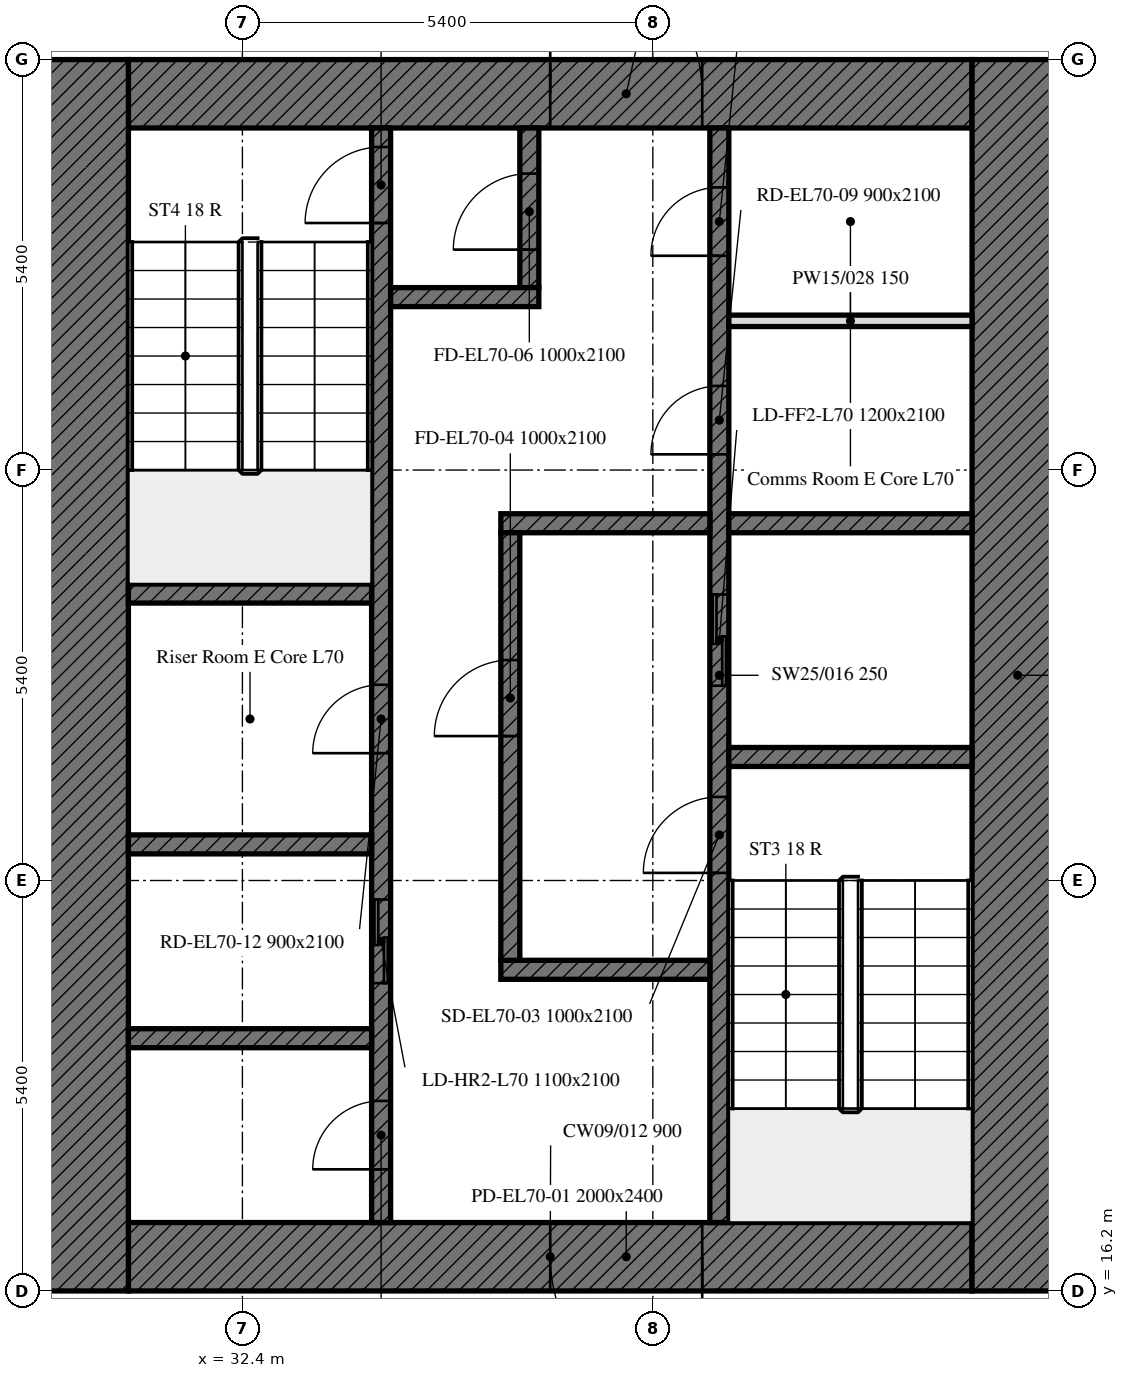
"""IFC4 building model, lengths in metres.
Left out: names, types, materials, properties, quantities, classifications, styles, units other than length and angle.
Written with IfcOpenShell. Run it as: python <this file> out.ifc"""

import sys

from ifc_helpers import new_model, si_unit, direction, frame, frame_2d, origin, place, context, subcontext, project, spatial, rectangle, extrude, element, fill, save


model = new_model("IFC4")
c1 = context("Model", 3, precision=1e-05, world=origin(), true_north=direction((0.0, 1.0)))
c2 = subcontext(c1, "Body", "Model", "MODEL_VIEW")
j1 = project(units=[si_unit("LENGTHUNIT", "METRE"), si_unit("PLANEANGLEUNIT", "RADIAN")], contexts=[c1])
p1 = place(None, origin())
s1 = spatial("IfcSite", under=j1, at=p1, CompositionType="ELEMENT")
p2 = place(p1, origin())
s2 = spatial("IfcBuilding", under=s1, at=p2, CompositionType="ELEMENT")
p3 = place(p2, frame((0.0, 0.0, 285.1)))
s3 = spatial("IfcBuildingStorey", under=s2, at=p3, CompositionType="ELEMENT", Elevation=285.1)
p4 = place(p3, frame((42.0, 16.65, 0.0), z_axis=(0.0, 0.0, 1.0), x_axis=(-1.0, 0.0, 0.0)))
e1 = element("IfcWall", 1, at=p4, inside=s3, PredefinedType="SOLIDWALL", context=c2, shape_type="SweptSolid", body=[
    extrude(rectangle(XDim=11.1, YDim=0.9, at=frame_2d((5.55, 0.0))), origin(), (0.0, 0.0, 1.0), 3.0),
])
p5 = place(p4, frame((3.55, 0.0, 0.0)))
e2 = element("IfcOpeningElement", 2, at=p5, cuts=e1, PredefinedType="OPENING", context=c2, shape_type="SweptSolid", body=[
    extrude(rectangle(XDim=2.0, YDim=2.4, at=frame_2d((1.0, 1.2))), frame((0.0, 0.45, 0.0), z_axis=(0.0, -1.0, 0.0), x_axis=(1.0, 0.0, 0.0)), (0.0, 0.0, 1.0), 0.9),
])
p6 = place(p3, frame((30.9, 31.95, 0.0), z_axis=(0.0, 0.0, 1.0), x_axis=(1.0, 0.0, 0.0)))
e3 = element("IfcWall", 3, at=p6, inside=s3, PredefinedType="SOLIDWALL", context=c2, shape_type="SweptSolid", body=[
    extrude(rectangle(XDim=11.1, YDim=0.9, at=frame_2d((5.55, 0.0))), origin(), (0.0, 0.0, 1.0), 3.0),
])
p7 = place(p6, frame((5.55, 0.0, 0.0)))
e4 = element("IfcOpeningElement", 4, at=p7, cuts=e3, PredefinedType="OPENING", context=c2, shape_type="SweptSolid", body=[
    extrude(rectangle(XDim=2.0, YDim=2.4, at=frame_2d((1.0, 1.2))), frame((0.0, 0.45, 0.0), z_axis=(0.0, -1.0, 0.0), x_axis=(1.0, 0.0, 0.0)), (0.0, 0.0, 1.0), 0.9),
])
for number, where, z_axis, x_axis in (
    (5, (42.6, 32.4, 0.0), (0.0, 0.0, 1.0), (0.0, -1.0, 0.0)),
    (6, (30.3, 16.2, 0.0), (0.0, 0.0, 1.0), (0.0, 1.0, 0.0)),
):
    element("IfcWall", number, at=place(p3, frame(where, z_axis=z_axis, x_axis=x_axis)), inside=s3, PredefinedType="SOLIDWALL", context=c2, shape_type="SweptSolid", body=[
        extrude(rectangle(XDim=16.2, YDim=1.2, at=frame_2d((8.1, 0.0))), origin(), (0.0, 0.0, 1.0), 3.0),
    ])
p8 = place(p3, frame((38.675, 17.1, 0.0), z_axis=(0.0, 0.0, 1.0), x_axis=(0.0, 1.0, 0.0)))
e7 = element("IfcWall", 7, at=p8, inside=s3, PredefinedType="SOLIDWALL", context=c2, shape_type="SweptSolid", body=[
    extrude(rectangle(XDim=14.4, YDim=0.25, at=frame_2d((7.2, 0.0))), origin(), (0.0, 0.0, 1.0), 3.0),
])
p9 = place(p8, frame((4.6, 0.0, 0.0)))
e8 = element("IfcOpeningElement", 8, at=p9, cuts=e7, PredefinedType="OPENING", context=c2, shape_type="SweptSolid", body=[
    extrude(rectangle(XDim=1.0, YDim=2.1, at=frame_2d((0.5, 1.05))), frame((0.0, 0.125, 0.0), z_axis=(0.0, -1.0, 0.0), x_axis=(1.0, 0.0, 0.0)), (0.0, 0.0, 1.0), 0.25),
])
p10 = place(p8, frame((7.062, 0.0, 0.0)))
e9 = element("IfcOpeningElement", 9, at=p10, cuts=e7, PredefinedType="OPENING", context=c2, shape_type="SweptSolid", body=[
    extrude(rectangle(XDim=1.2, YDim=2.1, at=frame_2d((0.6, 1.05))), frame((0.0, 0.125, 0.0), z_axis=(0.0, -1.0, 0.0), x_axis=(1.0, 0.0, 0.0)), (0.0, 0.0, 1.0), 0.25),
])
p11 = place(p8, frame((10.106, 0.0, 0.0)))
e10 = element("IfcOpeningElement", 10, at=p11, cuts=e7, PredefinedType="OPENING", context=c2, shape_type="SweptSolid", body=[
    extrude(rectangle(XDim=0.9, YDim=2.1, at=frame_2d((0.45, 1.05))), frame((0.0, 0.125, 0.0), z_axis=(0.0, -1.0, 0.0), x_axis=(1.0, 0.0, 0.0)), (0.0, 0.0, 1.0), 0.25),
])
p12 = place(p8, frame((12.719, 0.0, 0.0)))
e11 = element("IfcOpeningElement", 11, at=p12, cuts=e7, PredefinedType="OPENING", context=c2, shape_type="SweptSolid", body=[
    extrude(rectangle(XDim=0.9, YDim=2.1, at=frame_2d((0.45, 1.05))), frame((0.0, 0.125, 0.0), z_axis=(0.0, -1.0, 0.0), x_axis=(1.0, 0.0, 0.0)), (0.0, 0.0, 1.0), 0.25),
])
p13 = place(p3, frame((34.225, 17.1, 0.0), z_axis=(0.0, 0.0, 1.0), x_axis=(0.0, 1.0, 0.0)))
e12 = element("IfcWall", 12, at=p13, inside=s3, PredefinedType="SOLIDWALL", context=c2, shape_type="SweptSolid", body=[
    extrude(rectangle(XDim=14.4, YDim=0.25, at=frame_2d((7.2, 0.0))), origin(), (0.0, 0.0, 1.0), 3.0),
])
p14 = place(p13, frame((13.15, 0.0, 0.0)))
e13 = element("IfcOpeningElement", 13, at=p14, cuts=e12, PredefinedType="OPENING", context=c2, shape_type="SweptSolid", body=[
    extrude(rectangle(XDim=1.0, YDim=2.1, at=frame_2d((0.5, 1.05))), frame((0.0, 0.125, 0.0), z_axis=(0.0, -1.0, 0.0), x_axis=(1.0, 0.0, 0.0)), (0.0, 0.0, 1.0), 0.25),
])
p15 = place(p13, frame((3.15, 0.0, 0.0)))
e14 = element("IfcOpeningElement", 14, at=p15, cuts=e12, PredefinedType="OPENING", context=c2, shape_type="SweptSolid", body=[
    extrude(rectangle(XDim=1.1, YDim=2.1, at=frame_2d((0.55, 1.05))), frame((0.0, 0.125, 0.0), z_axis=(0.0, -1.0, 0.0), x_axis=(1.0, 0.0, 0.0)), (0.0, 0.0, 1.0), 0.25),
])
p16 = place(p13, frame((0.7, 0.0, 0.0)))
e15 = element("IfcOpeningElement", 15, at=p16, cuts=e12, PredefinedType="OPENING", context=c2, shape_type="SweptSolid", body=[
    extrude(rectangle(XDim=0.9, YDim=2.1, at=frame_2d((0.45, 1.05))), frame((0.0, 0.125, 0.0), z_axis=(0.0, -1.0, 0.0), x_axis=(1.0, 0.0, 0.0)), (0.0, 0.0, 1.0), 0.25),
])
p17 = place(p13, frame((6.175, 0.0, 0.0)))
e16 = element("IfcOpeningElement", 16, at=p17, cuts=e12, PredefinedType="OPENING", context=c2, shape_type="SweptSolid", body=[
    extrude(rectangle(XDim=0.9, YDim=2.1, at=frame_2d((0.45, 1.05))), frame((0.0, 0.125, 0.0), z_axis=(0.0, -1.0, 0.0), x_axis=(1.0, 0.0, 0.0)), (0.0, 0.0, 1.0), 0.25),
])
p18 = place(p3, frame((38.8, 23.225, 0.0), z_axis=(0.0, 0.0, 1.0), x_axis=(1.0, 0.0, 0.0)))
e17 = element("IfcWall", 17, at=p18, inside=s3, PredefinedType="SOLIDWALL", context=c2, shape_type="SweptSolid", body=[
    extrude(rectangle(XDim=3.2, YDim=0.25, at=frame_2d((1.6, 0.0))), origin(), (0.0, 0.0, 1.0), 3.0),
])
for number, where, z_axis, x_axis in (
    (18, (30.9, 25.375, 0.0), (0.0, 0.0, 1.0), (1.0, 0.0, 0.0)),
    (19, (30.9, 22.075, 0.0), (0.0, 0.0, 1.0), (1.0, 0.0, 0.0)),
):
    element("IfcWall", number, at=place(p3, frame(where, z_axis=z_axis, x_axis=x_axis)), inside=s3, PredefinedType="SOLIDWALL", context=c2, shape_type="SweptSolid", body=[
        extrude(rectangle(XDim=3.2, YDim=0.25, at=frame_2d((1.6, 0.0))), origin(), (0.0, 0.0, 1.0), 3.0),
    ])
p19 = place(p3, frame((38.8, 26.3, 0.0), z_axis=(0.0, 0.0, 1.0), x_axis=(1.0, 0.0, 0.0)))
e20 = element("IfcWall", 20, at=p19, inside=s3, PredefinedType="SOLIDWALL", context=c2, shape_type="SweptSolid", body=[
    extrude(rectangle(XDim=3.2, YDim=0.25, at=frame_2d((1.6, 0.0))), origin(), (0.0, 0.0, 1.0), 3.0),
])
for number, where, z_axis, x_axis in (
    (21, (35.8, 26.3, 0.0), (0.0, 0.0, 1.0), (1.0, 0.0, 0.0)),
    (22, (35.8, 20.425, 0.0), (0.0, 0.0, 1.0), (1.0, 0.0, 0.0)),
):
    element("IfcWall", number, at=place(p3, frame(where, z_axis=z_axis, x_axis=x_axis)), inside=s3, PredefinedType="SOLIDWALL", context=c2, shape_type="SweptSolid", body=[
        extrude(rectangle(XDim=2.75, YDim=0.25, at=frame_2d((1.375, 0.0))), origin(), (0.0, 0.0, 1.0), 3.0),
    ])
p20 = place(p3, frame((36.175, 29.4, 0.0), z_axis=(0.0, 0.0, 1.0), x_axis=(0.0, 1.0, 0.0)))
e23 = element("IfcWall", 23, at=p20, inside=s3, PredefinedType="SOLIDWALL", context=c2, shape_type="SweptSolid", body=[
    extrude(rectangle(XDim=2.1, YDim=0.25, at=frame_2d((1.05, 0.0))), origin(), (0.0, 0.0, 1.0), 3.0),
])
p21 = place(p20, frame((0.5, 0.0, 0.0)))
e24 = element("IfcOpeningElement", 24, at=p21, cuts=e23, PredefinedType="OPENING", context=c2, shape_type="SweptSolid", body=[
    extrude(rectangle(XDim=1.0, YDim=2.1, at=frame_2d((0.5, 1.05))), frame((0.0, 0.125, 0.0), z_axis=(0.0, -1.0, 0.0), x_axis=(1.0, 0.0, 0.0)), (0.0, 0.0, 1.0), 0.25),
])
p22 = place(p3, frame((34.35, 29.275, 0.0), z_axis=(0.0, 0.0, 1.0), x_axis=(1.0, 0.0, 0.0)))
e25 = element("IfcWall", 25, at=p22, inside=s3, PredefinedType="SOLIDWALL", context=c2, shape_type="SweptSolid", body=[
    extrude(rectangle(XDim=1.95, YDim=0.25, at=frame_2d((0.975, 0.0))), origin(), (0.0, 0.0, 1.0), 3.0),
])
p23 = place(p3, frame((35.925, 20.55, 0.0), z_axis=(0.0, 0.0, 1.0), x_axis=(0.0, 1.0, 0.0)))
e26 = element("IfcWall", 26, at=p23, inside=s3, PredefinedType="SOLIDWALL", context=c2, shape_type="SweptSolid", body=[
    extrude(rectangle(XDim=5.625, YDim=0.25, at=frame_2d((2.812, 0.0))), origin(), (0.0, 0.0, 1.0), 3.0),
])
p24 = place(p23, frame((2.95, 0.0, 0.0)))
e27 = element("IfcOpeningElement", 27, at=p24, cuts=e26, PredefinedType="OPENING", context=c2, shape_type="SweptSolid", body=[
    extrude(rectangle(XDim=1.0, YDim=2.1, at=frame_2d((0.5, 1.05))), frame((0.0, 0.125, 0.0), z_axis=(0.0, -1.0, 0.0), x_axis=(1.0, 0.0, 0.0)), (0.0, 0.0, 1.0), 0.25),
])
p25 = place(p3, frame((30.9, 19.525, 0.0), z_axis=(0.0, 0.0, 1.0), x_axis=(1.0, 0.0, 0.0)))
e28 = element("IfcWall", 28, at=p25, inside=s3, PredefinedType="SOLIDWALL", context=c2, shape_type="SweptSolid", body=[
    extrude(rectangle(XDim=3.2, YDim=0.25, at=frame_2d((1.6, 0.0))), origin(), (0.0, 0.0, 1.0), 3.0),
])
p26 = place(p3, frame((38.8, 28.963, 0.0), z_axis=(0.0, 0.0, 1.0), x_axis=(1.0, 0.0, 0.0)))
e29 = element("IfcWall", 29, at=p26, inside=s3, PredefinedType="PARTITIONING", context=c2, shape_type="SweptSolid", body=[
    extrude(rectangle(XDim=3.2, YDim=0.15, at=frame_2d((1.6, 0.0))), origin(), (0.0, 0.0, 1.0), 3.0),
])
p27 = place(p5, origin())
e30 = element("IfcDoor", 30, at=p27, inside=s3, OperationType="DOUBLE_DOOR_SINGLE_SWING", PredefinedType="DOOR", context=c2, shape_type="SweptSolid", body=[
    extrude(rectangle(XDim=2.0, YDim=2.4, at=frame_2d((1.0, 1.2))), frame((0.0, 0.025, 0.0), z_axis=(0.0, -1.0, 0.0), x_axis=(1.0, 0.0, 0.0)), (0.0, 0.0, 1.0), 0.05),
])
fill(e2, e30)
p28 = place(p7, origin())
e31 = element("IfcDoor", 31, at=p28, inside=s3, OperationType="DOUBLE_DOOR_SINGLE_SWING", PredefinedType="DOOR", context=c2, shape_type="SweptSolid", body=[
    extrude(rectangle(XDim=2.0, YDim=2.4, at=frame_2d((1.0, 1.2))), frame((0.0, 0.025, 0.0), z_axis=(0.0, -1.0, 0.0), x_axis=(1.0, 0.0, 0.0)), (0.0, 0.0, 1.0), 0.05),
])
fill(e4, e31)
p29 = place(p9, origin())
e32 = element("IfcDoor", 32, at=p29, inside=s3, OperationType="SINGLE_SWING_LEFT", PredefinedType="DOOR", context=c2, shape_type="SweptSolid", body=[
    extrude(rectangle(XDim=1.0, YDim=2.1, at=frame_2d((0.5, 1.05))), frame((0.0, 0.025, 0.0), z_axis=(0.0, -1.0, 0.0), x_axis=(1.0, 0.0, 0.0)), (0.0, 0.0, 1.0), 0.05),
])
fill(e8, e32)
p30 = place(p24, origin())
e33 = element("IfcDoor", 33, at=p30, inside=s3, OperationType="SINGLE_SWING_LEFT", PredefinedType="DOOR", context=c2, shape_type="SweptSolid", body=[
    extrude(rectangle(XDim=1.0, YDim=2.1, at=frame_2d((0.5, 1.05))), frame((0.0, 0.025, 0.0), z_axis=(0.0, -1.0, 0.0), x_axis=(1.0, 0.0, 0.0)), (0.0, 0.0, 1.0), 0.05),
])
fill(e27, e33)
p31 = place(p14, origin())
e34 = element("IfcDoor", 34, at=p31, inside=s3, OperationType="SINGLE_SWING_LEFT", PredefinedType="DOOR", context=c2, shape_type="SweptSolid", body=[
    extrude(rectangle(XDim=1.0, YDim=2.1, at=frame_2d((0.5, 1.05))), frame((0.0, 0.025, 0.0), z_axis=(0.0, -1.0, 0.0), x_axis=(1.0, 0.0, 0.0)), (0.0, 0.0, 1.0), 0.05),
])
fill(e13, e34)
p32 = place(p21, origin())
e35 = element("IfcDoor", 35, at=p32, inside=s3, OperationType="SINGLE_SWING_LEFT", PredefinedType="DOOR", context=c2, shape_type="SweptSolid", body=[
    extrude(rectangle(XDim=1.0, YDim=2.1, at=frame_2d((0.5, 1.05))), frame((0.0, 0.025, 0.0), z_axis=(0.0, -1.0, 0.0), x_axis=(1.0, 0.0, 0.0)), (0.0, 0.0, 1.0), 0.05),
])
fill(e24, e35)
p33 = place(p10, origin())
e36 = element("IfcDoor", 36, at=p33, inside=s3, OperationType="DOUBLE_DOOR_SLIDING", PredefinedType="DOOR", context=c2, shape_type="SweptSolid", body=[
    extrude(rectangle(XDim=1.2, YDim=2.1, at=frame_2d((0.6, 1.05))), frame((0.0, 0.025, 0.0), z_axis=(0.0, -1.0, 0.0), x_axis=(1.0, 0.0, 0.0)), (0.0, 0.0, 1.0), 0.05),
])
fill(e9, e36)
p34 = place(p15, origin())
e37 = element("IfcDoor", 37, at=p34, inside=s3, OperationType="DOUBLE_DOOR_SLIDING", PredefinedType="DOOR", context=c2, shape_type="SweptSolid", body=[
    extrude(rectangle(XDim=1.1, YDim=2.1, at=frame_2d((0.55, 1.05))), frame((0.0, 0.025, 0.0), z_axis=(0.0, -1.0, 0.0), x_axis=(1.0, 0.0, 0.0)), (0.0, 0.0, 1.0), 0.05),
])
fill(e14, e37)
p35 = place(p11, origin())
e38 = element("IfcDoor", 38, at=p35, inside=s3, OperationType="SINGLE_SWING_LEFT", PredefinedType="DOOR", context=c2, shape_type="SweptSolid", body=[
    extrude(rectangle(XDim=0.9, YDim=2.1, at=frame_2d((0.45, 1.05))), frame((0.0, 0.025, 0.0), z_axis=(0.0, -1.0, 0.0), x_axis=(1.0, 0.0, 0.0)), (0.0, 0.0, 1.0), 0.05),
])
fill(e10, e38)
p36 = place(p12, origin())
e39 = element("IfcDoor", 39, at=p36, inside=s3, OperationType="SINGLE_SWING_LEFT", PredefinedType="DOOR", context=c2, shape_type="SweptSolid", body=[
    extrude(rectangle(XDim=0.9, YDim=2.1, at=frame_2d((0.45, 1.05))), frame((0.0, 0.025, 0.0), z_axis=(0.0, -1.0, 0.0), x_axis=(1.0, 0.0, 0.0)), (0.0, 0.0, 1.0), 0.05),
])
fill(e11, e39)
p37 = place(p16, origin())
e40 = element("IfcDoor", 40, at=p37, inside=s3, OperationType="SINGLE_SWING_LEFT", PredefinedType="DOOR", context=c2, shape_type="SweptSolid", body=[
    extrude(rectangle(XDim=0.9, YDim=2.1, at=frame_2d((0.45, 1.05))), frame((0.0, 0.025, 0.0), z_axis=(0.0, -1.0, 0.0), x_axis=(1.0, 0.0, 0.0)), (0.0, 0.0, 1.0), 0.05),
])
fill(e15, e40)
p38 = place(p17, origin())
e41 = element("IfcDoor", 41, at=p38, inside=s3, OperationType="SINGLE_SWING_LEFT", PredefinedType="DOOR", context=c2, shape_type="SweptSolid", body=[
    extrude(rectangle(XDim=0.9, YDim=2.1, at=frame_2d((0.45, 1.05))), frame((0.0, 0.025, 0.0), z_axis=(0.0, -1.0, 0.0), x_axis=(1.0, 0.0, 0.0)), (0.0, 0.0, 1.0), 0.05),
])
fill(e16, e41)
save(model, sys.argv[1])
